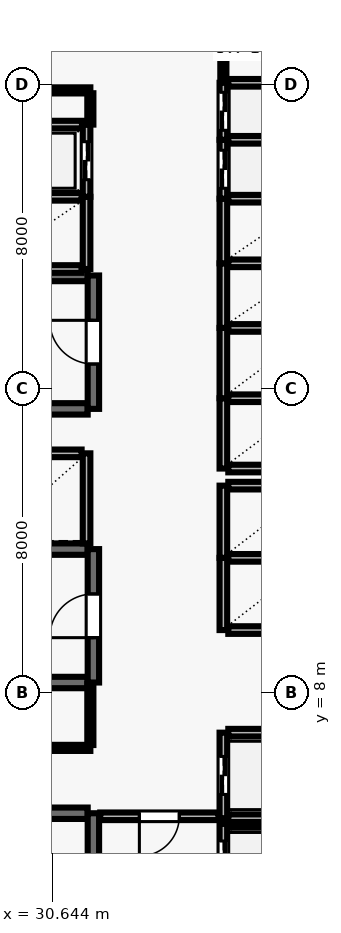
"""IFC4 building model, lengths in metres.
Left out: names, types, materials, properties, quantities, classifications, styles, units other than length and angle.
Written with IfcOpenShell. Run it as: python <this file> out.ifc"""

import sys

from ifc_helpers import new_model, si_unit, direction, frame, frame_2d, origin, place, context, subcontext, project, spatial, rectangle, extrude, element, fill, save


model = new_model("IFC4")
c1 = context("Model", 3, precision=1e-05, world=origin(), true_north=direction((0.0, 1.0)))
c2 = subcontext(c1, "Body", "Model", "MODEL_VIEW")
j1 = project(units=[si_unit("LENGTHUNIT", "METRE"), si_unit("PLANEANGLEUNIT", "RADIAN")], contexts=[c1])
p1 = place(None, origin())
s1 = spatial("IfcSite", under=j1, at=p1, CompositionType="ELEMENT")
p2 = place(p1, origin())
s2 = spatial("IfcBuilding", under=s1, at=p2, CompositionType="ELEMENT")
p3 = place(p2, frame((0.0, 0.0, 70.0)))
s3 = spatial("IfcBuildingStorey", under=s2, at=p3, CompositionType="ELEMENT", Elevation=70.0)
p4 = place(p3, frame((31.58, 4.83, 0.0), z_axis=(0.0, 0.0, 1.0), x_axis=(-1.0, 0.0, 0.0)))
e1 = element("IfcWall", 1, at=p4, inside=s3, PredefinedType="SHEAR", context=c2, shape_type="SweptSolid", body=[
    extrude(rectangle(XDim=8.36, YDim=0.3, at=frame_2d((4.18, 0.0))), origin(), (0.0, 0.0, 1.0), 3.69),
])
p5 = place(p3, frame((31.73, 0.96, 0.0), z_axis=(0.0, 0.0, 1.0), x_axis=(0.0, 1.0, 0.0)))
e2 = element("IfcWall", 2, at=p5, inside=s3, PredefinedType="SHEAR", context=c2, shape_type="SweptSolid", body=[
    extrude(rectangle(XDim=3.87, YDim=0.3, at=frame_2d((1.935, 0.0))), origin(), (0.0, 0.0, 1.0), 3.69),
])
p6 = place(p5, frame((1.54, 0.0, 0.0)))
e3 = element("IfcOpeningElement", 3, at=p6, cuts=e2, PredefinedType="OPENING", context=c2, shape_type="SweptSolid", body=[
    extrude(rectangle(XDim=1.15, YDim=2.15, at=frame_2d((0.575, 1.075))), frame((0.0, 0.16, 0.0), z_axis=(0.0, -1.0, 0.0), x_axis=(1.0, 0.0, 0.0)), (0.0, 0.0, 1.0), 0.32),
])
for number, where, z_axis, x_axis in (
    (4, (31.58, 18.98, 0.0), (0.0, 0.0, 1.0), (-1.0, 0.0, 0.0)),
    (5, (23.22, 15.47, 0.0), (0.0, 0.0, 1.0), (1.0, 0.0, 0.0)),
):
    element("IfcWall", number, at=place(p3, frame(where, z_axis=z_axis, x_axis=x_axis)), inside=s3, PredefinedType="SHEAR", context=c2, shape_type="SweptSolid", body=[
        extrude(rectangle(XDim=8.36, YDim=0.3, at=frame_2d((4.18, 0.0))), origin(), (0.0, 0.0, 1.0), 3.69),
    ])
p7 = place(p3, frame((31.73, 15.47, 0.0), z_axis=(0.0, 0.0, 1.0), x_axis=(0.0, 1.0, 0.0)))
e6 = element("IfcWall", 6, at=p7, inside=s3, PredefinedType="SHEAR", context=c2, shape_type="SweptSolid", body=[
    extrude(rectangle(XDim=3.51, YDim=0.3, at=frame_2d((1.755, 0.0))), origin(), (0.0, 0.0, 1.0), 3.69),
])
p8 = place(p7, frame((1.18, 0.0, 0.0)))
e7 = element("IfcOpeningElement", 7, at=p8, cuts=e6, PredefinedType="OPENING", context=c2, shape_type="SweptSolid", body=[
    extrude(rectangle(XDim=1.15, YDim=2.15, at=frame_2d((0.575, 1.075))), frame((0.0, 0.16, 0.0), z_axis=(0.0, -1.0, 0.0), x_axis=(1.0, 0.0, 0.0)), (0.0, 0.0, 1.0), 0.32),
])
for number, where, z_axis, x_axis in (
    (8, (31.58, 11.78, 0.0), (0.0, 0.0, 1.0), (-1.0, 0.0, 0.0)),
    (9, (23.22, 8.27, 0.0), (0.0, 0.0, 1.0), (1.0, 0.0, 0.0)),
):
    element("IfcWall", number, at=place(p3, frame(where, z_axis=z_axis, x_axis=x_axis)), inside=s3, PredefinedType="SHEAR", context=c2, shape_type="SweptSolid", body=[
        extrude(rectangle(XDim=8.36, YDim=0.3, at=frame_2d((4.18, 0.0))), origin(), (0.0, 0.0, 1.0), 3.69),
    ])
p9 = place(p3, frame((31.73, 8.27, 0.0), z_axis=(0.0, 0.0, 1.0), x_axis=(0.0, 1.0, 0.0)))
e10 = element("IfcWall", 10, at=p9, inside=s3, PredefinedType="SHEAR", context=c2, shape_type="SweptSolid", body=[
    extrude(rectangle(XDim=3.51, YDim=0.3, at=frame_2d((1.755, 0.0))), origin(), (0.0, 0.0, 1.0), 3.69),
])
p10 = place(p9, frame((1.18, 0.0, 0.0)))
e11 = element("IfcOpeningElement", 11, at=p10, cuts=e10, PredefinedType="OPENING", context=c2, shape_type="SweptSolid", body=[
    extrude(rectangle(XDim=1.15, YDim=2.15, at=frame_2d((0.575, 1.075))), frame((0.0, 0.16, 0.0), z_axis=(0.0, -1.0, 0.0), x_axis=(1.0, 0.0, 0.0)), (0.0, 0.0, 1.0), 0.32),
])
p11 = place(p3, frame((35.15, 4.55, 0.0), z_axis=(0.0, 0.0, 1.0), x_axis=(0.0, -1.0, 0.0)))
e12 = element("IfcWall", 12, at=p11, inside=s3, PredefinedType="SOLIDWALL", context=c2, shape_type="SweptSolid", body=[
    extrude(rectangle(XDim=2.1, YDim=0.2, at=frame_2d((1.05, 0.0))), origin(), (0.0, 0.0, 1.0), 3.69),
])
p12 = place(p11, frame((0.45, 0.0, 0.0)))
e13 = element("IfcOpeningElement", 13, at=p12, cuts=e12, PredefinedType="OPENING", context=c2, shape_type="SweptSolid", body=[
    extrude(rectangle(XDim=1.2, YDim=2.15, at=frame_2d((0.6, 1.075))), frame((0.0, 0.11, 0.0), z_axis=(0.0, -1.0, 0.0), x_axis=(1.0, 0.0, 0.0)), (0.0, 0.0, 1.0), 0.22),
])
p13 = place(p3, frame((37.42, 4.55, 0.0), z_axis=(0.0, 0.0, 1.0), x_axis=(-1.0, 0.0, 0.0)))
e14 = element("IfcWall", 14, at=p13, inside=s3, PredefinedType="SOLIDWALL", context=c2, shape_type="SweptSolid", body=[
    extrude(rectangle(XDim=2.14, YDim=0.2, at=frame_2d((1.07, 0.0))), origin(), (0.0, 0.0, 1.0), 3.69),
])
p14 = place(p3, frame((35.15, 6.95, 0.0), z_axis=(0.0, 0.0, 1.0), x_axis=(0.0, -1.0, 0.0)))
e15 = element("IfcWall", 15, at=p14, inside=s3, PredefinedType="SOLIDWALL", context=c2, shape_type="SweptSolid", body=[
    extrude(rectangle(XDim=2.25, YDim=0.2, at=frame_2d((1.125, 0.0))), origin(), (0.0, 0.0, 1.0), 3.69),
])
p15 = place(p14, frame((0.625, 0.0, 0.0)))
e16 = element("IfcOpeningElement", 16, at=p15, cuts=e15, PredefinedType="OPENING", context=c2, shape_type="SweptSolid", body=[
    extrude(rectangle(XDim=1.0, YDim=2.1, at=frame_2d((0.5, 1.05))), frame((0.0, 0.11, 0.0), z_axis=(0.0, -1.0, 0.0), x_axis=(1.0, 0.0, 0.0)), (0.0, 0.0, 1.0), 0.22),
])
for number, where, z_axis, x_axis in (
    (17, (35.28, 4.7, 0.0), (0.0, 0.0, 1.0), (1.0, 0.0, 0.0)),
    (18, (37.42, 6.95, 0.0), (0.0, 0.0, 1.0), (-1.0, 0.0, 0.0)),
):
    element("IfcWall", number, at=place(p3, frame(where, z_axis=z_axis, x_axis=x_axis)), inside=s3, PredefinedType="SOLIDWALL", context=c2, shape_type="SweptSolid", body=[
        extrude(rectangle(XDim=2.14, YDim=0.2, at=frame_2d((1.07, 0.0))), origin(), (0.0, 0.0, 1.0), 3.69),
    ])
p16 = place(p3, frame((35.15, 11.55, 0.0), z_axis=(0.0, 0.0, 1.0), x_axis=(0.0, -1.0, 0.0)))
e19 = element("IfcWall", 19, at=p16, inside=s3, PredefinedType="SOLIDWALL", context=c2, shape_type="SweptSolid", body=[
    extrude(rectangle(XDim=1.9, YDim=0.2, at=frame_2d((0.95, 0.0))), origin(), (0.0, 0.0, 1.0), 3.69),
])
for number, where, z_axis, x_axis in (
    (20, (35.28, 9.65, 0.0), (0.0, 0.0, 1.0), (1.0, 0.0, 0.0)),
    (21, (37.42, 11.55, 0.0), (0.0, 0.0, 1.0), (-1.0, 0.0, 0.0)),
):
    element("IfcWall", number, at=place(p3, frame(where, z_axis=z_axis, x_axis=x_axis)), inside=s3, PredefinedType="SOLIDWALL", context=c2, shape_type="SweptSolid", body=[
        extrude(rectangle(XDim=2.14, YDim=0.2, at=frame_2d((1.07, 0.0))), origin(), (0.0, 0.0, 1.0), 3.69),
    ])
p17 = place(p3, frame((35.15, 13.45, 0.0), z_axis=(0.0, 0.0, 1.0), x_axis=(0.0, -1.0, 0.0)))
e22 = element("IfcWall", 22, at=p17, inside=s3, PredefinedType="SOLIDWALL", context=c2, shape_type="SweptSolid", body=[
    extrude(rectangle(XDim=1.9, YDim=0.2, at=frame_2d((0.95, 0.0))), origin(), (0.0, 0.0, 1.0), 3.69),
])
p18 = place(p3, frame((37.42, 13.45, 0.0), z_axis=(0.0, 0.0, 1.0), x_axis=(-1.0, 0.0, 0.0)))
e23 = element("IfcWall", 23, at=p18, inside=s3, PredefinedType="SOLIDWALL", context=c2, shape_type="SweptSolid", body=[
    extrude(rectangle(XDim=2.14, YDim=0.2, at=frame_2d((1.07, 0.0))), origin(), (0.0, 0.0, 1.0), 3.69),
])
p19 = place(p3, frame((31.55, 11.93, 0.0), z_axis=(0.0, 0.0, 1.0), x_axis=(0.0, 1.0, 0.0)))
e24 = element("IfcWall", 24, at=p19, inside=s3, PredefinedType="SOLIDWALL", context=c2, shape_type="SweptSolid", body=[
    extrude(rectangle(XDim=2.37, YDim=0.2, at=frame_2d((1.185, 0.0))), origin(), (0.0, 0.0, 1.0), 3.69),
])
p20 = place(p3, frame((31.42, 14.3, 0.0), z_axis=(0.0, 0.0, 1.0), x_axis=(-1.0, 0.0, 0.0)))
e25 = element("IfcWall", 25, at=p20, inside=s3, PredefinedType="SOLIDWALL", context=c2, shape_type="SweptSolid", body=[
    extrude(rectangle(XDim=2.44, YDim=0.2, at=frame_2d((1.22, 0.0))), origin(), (0.0, 0.0, 1.0), 3.69),
])
p21 = place(p3, frame((35.15, 15.75, 0.0), z_axis=(0.0, 0.0, 1.0), x_axis=(0.0, -1.0, 0.0)))
e26 = element("IfcWall", 26, at=p21, inside=s3, PredefinedType="SOLIDWALL", context=c2, shape_type="SweptSolid", body=[
    extrude(rectangle(XDim=1.85, YDim=0.2, at=frame_2d((0.925, 0.0))), origin(), (0.0, 0.0, 1.0), 3.69),
])
for number, where, z_axis, x_axis in (
    (27, (35.28, 13.9, 0.0), (0.0, 0.0, 1.0), (1.0, 0.0, 0.0)),
    (28, (37.42, 15.75, 0.0), (0.0, 0.0, 1.0), (-1.0, 0.0, 0.0)),
):
    element("IfcWall", number, at=place(p3, frame(where, z_axis=z_axis, x_axis=x_axis)), inside=s3, PredefinedType="SOLIDWALL", context=c2, shape_type="SweptSolid", body=[
        extrude(rectangle(XDim=2.14, YDim=0.2, at=frame_2d((1.07, 0.0))), origin(), (0.0, 0.0, 1.0), 3.69),
    ])
p22 = place(p3, frame((35.15, 17.6, 0.0), z_axis=(0.0, 0.0, 1.0), x_axis=(0.0, -1.0, 0.0)))
e29 = element("IfcWall", 29, at=p22, inside=s3, PredefinedType="SOLIDWALL", context=c2, shape_type="SweptSolid", body=[
    extrude(rectangle(XDim=1.85, YDim=0.2, at=frame_2d((0.925, 0.0))), origin(), (0.0, 0.0, 1.0), 3.69),
])
p23 = place(p3, frame((37.42, 17.6, 0.0), z_axis=(0.0, 0.0, 1.0), x_axis=(-1.0, 0.0, 0.0)))
e30 = element("IfcWall", 30, at=p23, inside=s3, PredefinedType="SOLIDWALL", context=c2, shape_type="SweptSolid", body=[
    extrude(rectangle(XDim=2.14, YDim=0.2, at=frame_2d((1.07, 0.0))), origin(), (0.0, 0.0, 1.0), 3.69),
])
p24 = place(p3, frame((35.15, 19.3, 0.0), z_axis=(0.0, 0.0, 1.0), x_axis=(0.0, -1.0, 0.0)))
e31 = element("IfcWall", 31, at=p24, inside=s3, PredefinedType="SOLIDWALL", context=c2, shape_type="SweptSolid", body=[
    extrude(rectangle(XDim=1.7, YDim=0.2, at=frame_2d((0.85, 0.0))), origin(), (0.0, 0.0, 1.0), 3.69),
])
p25 = place(p3, frame((37.42, 19.3, 0.0), z_axis=(0.0, 0.0, 1.0), x_axis=(-1.0, 0.0, 0.0)))
e32 = element("IfcWall", 32, at=p25, inside=s3, PredefinedType="SOLIDWALL", context=c2, shape_type="SweptSolid", body=[
    extrude(rectangle(XDim=2.14, YDim=0.2, at=frame_2d((1.07, 0.0))), origin(), (0.0, 0.0, 1.0), 3.69),
])
p26 = place(p3, frame((35.15, 21.0, 0.0), z_axis=(0.0, 0.0, 1.0), x_axis=(0.0, -1.0, 0.0)))
e33 = element("IfcWall", 33, at=p26, inside=s3, PredefinedType="SOLIDWALL", context=c2, shape_type="SweptSolid", body=[
    extrude(rectangle(XDim=1.7, YDim=0.2, at=frame_2d((0.85, 0.0))), origin(), (0.0, 0.0, 1.0), 3.69),
])
p27 = place(p3, frame((37.42, 21.0, 0.0), z_axis=(0.0, 0.0, 1.0), x_axis=(-1.0, 0.0, 0.0)))
e34 = element("IfcWall", 34, at=p27, inside=s3, PredefinedType="SOLIDWALL", context=c2, shape_type="SweptSolid", body=[
    extrude(rectangle(XDim=2.14, YDim=0.2, at=frame_2d((1.07, 0.0))), origin(), (0.0, 0.0, 1.0), 3.69),
])
p28 = place(p3, frame((31.55, 19.15, 0.0), z_axis=(0.0, 0.0, 1.0), x_axis=(0.0, 1.0, 0.0)))
e35 = element("IfcWall", 35, at=p28, inside=s3, PredefinedType="SOLIDWALL", context=c2, shape_type="SweptSolid", body=[
    extrude(rectangle(XDim=1.9, YDim=0.2, at=frame_2d((0.95, 0.0))), origin(), (0.0, 0.0, 1.0), 3.69),
])
for number, where, z_axis, x_axis in (
    (36, (28.98, 19.15, 0.0), (0.0, 0.0, 1.0), (1.0, 0.0, 0.0)),
    (37, (31.42, 21.05, 0.0), (0.0, 0.0, 1.0), (-1.0, 0.0, 0.0)),
):
    element("IfcWall", number, at=place(p3, frame(where, z_axis=z_axis, x_axis=x_axis)), inside=s3, PredefinedType="SOLIDWALL", context=c2, shape_type="SweptSolid", body=[
        extrude(rectangle(XDim=2.44, YDim=0.2, at=frame_2d((1.22, 0.0))), origin(), (0.0, 0.0, 1.0), 3.69),
    ])
p29 = place(p3, frame((35.15, 22.55, 0.0), z_axis=(0.0, 0.0, 1.0), x_axis=(0.0, -1.0, 0.0)))
e38 = element("IfcWall", 38, at=p29, inside=s3, PredefinedType="SOLIDWALL", context=c2, shape_type="SweptSolid", body=[
    extrude(rectangle(XDim=1.55, YDim=0.2, at=frame_2d((0.775, 0.0))), origin(), (0.0, 0.0, 1.0), 3.69),
])
p30 = place(p29, frame((0.275, 0.0, 0.0)))
e39 = element("IfcOpeningElement", 39, at=p30, cuts=e38, PredefinedType="OPENING", context=c2, shape_type="SweptSolid", body=[
    extrude(rectangle(XDim=1.0, YDim=2.1, at=frame_2d((0.5, 1.05))), frame((0.0, 0.11, 0.0), z_axis=(0.0, -1.0, 0.0), x_axis=(1.0, 0.0, 0.0)), (0.0, 0.0, 1.0), 0.22),
])
p31 = place(p3, frame((37.42, 22.55, 0.0), z_axis=(0.0, 0.0, 1.0), x_axis=(-1.0, 0.0, 0.0)))
e40 = element("IfcWall", 40, at=p31, inside=s3, PredefinedType="SOLIDWALL", context=c2, shape_type="SweptSolid", body=[
    extrude(rectangle(XDim=2.14, YDim=0.2, at=frame_2d((1.07, 0.0))), origin(), (0.0, 0.0, 1.0), 3.69),
])
p32 = place(p3, frame((35.15, 24.05, 0.0), z_axis=(0.0, 0.0, 1.0), x_axis=(0.0, -1.0, 0.0)))
e41 = element("IfcWall", 41, at=p32, inside=s3, PredefinedType="SOLIDWALL", context=c2, shape_type="SweptSolid", body=[
    extrude(rectangle(XDim=1.5, YDim=0.2, at=frame_2d((0.75, 0.0))), origin(), (0.0, 0.0, 1.0), 3.69),
])
p33 = place(p32, frame((0.25, 0.0, 0.0)))
e42 = element("IfcOpeningElement", 42, at=p33, cuts=e41, PredefinedType="OPENING", context=c2, shape_type="SweptSolid", body=[
    extrude(rectangle(XDim=1.0, YDim=2.1, at=frame_2d((0.5, 1.05))), frame((0.0, 0.11, 0.0), z_axis=(0.0, -1.0, 0.0), x_axis=(1.0, 0.0, 0.0)), (0.0, 0.0, 1.0), 0.22),
])
p34 = place(p3, frame((37.42, 24.05, 0.0), z_axis=(0.0, 0.0, 1.0), x_axis=(-1.0, 0.0, 0.0)))
e43 = element("IfcWall", 43, at=p34, inside=s3, PredefinedType="SOLIDWALL", context=c2, shape_type="SweptSolid", body=[
    extrude(rectangle(XDim=2.14, YDim=0.2, at=frame_2d((1.07, 0.0))), origin(), (0.0, 0.0, 1.0), 3.69),
])
p35 = place(p3, frame((31.55, 21.05, 0.0), z_axis=(0.0, 0.0, 1.0), x_axis=(0.0, 1.0, 0.0)))
e44 = element("IfcWall", 44, at=p35, inside=s3, PredefinedType="SOLIDWALL", context=c2, shape_type="SweptSolid", body=[
    extrude(rectangle(XDim=1.9, YDim=0.2, at=frame_2d((0.95, 0.0))), origin(), (0.0, 0.0, 1.0), 3.69),
])
p36 = place(p35, frame((0.45, 0.0, 0.0)))
e45 = element("IfcOpeningElement", 45, at=p36, cuts=e44, PredefinedType="OPENING", context=c2, shape_type="SweptSolid", body=[
    extrude(rectangle(XDim=1.0, YDim=2.1, at=frame_2d((0.5, 1.05))), frame((0.0, 0.11, 0.0), z_axis=(0.0, -1.0, 0.0), x_axis=(1.0, 0.0, 0.0)), (0.0, 0.0, 1.0), 0.22),
])
p37 = place(p3, frame((31.43, 22.95, 0.0), z_axis=(0.0, 0.0, 1.0), x_axis=(-1.0, 0.0, 0.0)))
e46 = element("IfcWall", 46, at=p37, inside=s3, PredefinedType="SOLIDWALL", context=c2, shape_type="SweptSolid", body=[
    extrude(rectangle(XDim=2.46, YDim=0.2, at=frame_2d((1.23, 0.0))), origin(), (0.0, 0.0, 1.0), 3.69),
])
p38 = place(p3, frame((28.8, 23.85, 0.0), z_axis=(0.0, 0.0, 1.0), x_axis=(1.0, 0.0, 0.0)))
e47 = element("IfcWall", 47, at=p38, inside=s3, PredefinedType="PARTITIONING", context=c2, shape_type="SweptSolid", body=[
    extrude(rectangle(XDim=2.85, YDim=0.16, at=frame_2d((1.425, 0.0))), origin(), (0.0, 0.0, 1.0), 3.69),
])
p39 = place(p3, frame((31.65, 6.55, 0.0), z_axis=(0.0, 0.0, 1.0), x_axis=(-1.0, 0.0, 0.0)))
e48 = element("IfcWall", 48, at=p39, inside=s3, PredefinedType="PARTITIONING", context=c2, shape_type="SweptSolid", body=[
    extrude(rectangle(XDim=4.75, YDim=0.16, at=frame_2d((2.375, 0.0))), origin(), (0.0, 0.0, 1.0), 3.69),
])
p40 = place(p39, frame((1.935, 0.0, 0.0)))
e49 = element("IfcOpeningElement", 49, at=p40, cuts=e48, PredefinedType="OPENING", context=c2, shape_type="SweptSolid", body=[
    extrude(rectangle(XDim=0.88, YDim=2.1, at=frame_2d((0.44, 1.05))), frame((0.0, 0.09, 0.0), z_axis=(0.0, -1.0, 0.0), x_axis=(1.0, 0.0, 0.0)), (0.0, 0.0, 1.0), 0.18),
])
p41 = place(p3, frame((35.02, 4.75, 0.0), z_axis=(0.0, 0.0, 1.0), x_axis=(-1.0, 0.0, 0.0)))
e50 = element("IfcWall", 50, at=p41, inside=s3, PredefinedType="SOLIDWALL", context=c2, shape_type="SweptSolid", body=[
    extrude(rectangle(XDim=3.11, YDim=0.2, at=frame_2d((1.555, 0.0))), origin(), (0.0, 0.0, 1.0), 3.69),
])
p42 = place(p41, frame((1.03, 0.0, 0.0)))
e51 = element("IfcOpeningElement", 51, at=p42, cuts=e50, PredefinedType="OPENING", context=c2, shape_type="SweptSolid", body=[
    extrude(rectangle(XDim=1.05, YDim=2.15, at=frame_2d((0.525, 1.075))), frame((0.0, 0.11, 0.0), z_axis=(0.0, -1.0, 0.0), x_axis=(1.0, 0.0, 0.0)), (0.0, 0.0, 1.0), 0.22),
])
p43 = place(p3, frame((31.65, 8.24, 0.0), z_axis=(0.0, 0.0, 1.0), x_axis=(0.0, -1.0, 0.0)))
e52 = element("IfcWall", 52, at=p43, inside=s3, PredefinedType="PARTITIONING", context=c2, shape_type="SweptSolid", body=[
    extrude(rectangle(XDim=1.615, YDim=0.16, at=frame_2d((0.808, 0.0))), origin(), (0.0, 0.0, 1.0), 3.69),
])
p44 = place(p3, frame((31.65, 23.775, 0.0), z_axis=(0.0, 0.0, 1.0), x_axis=(0.0, -1.0, 0.0)))
e53 = element("IfcWall", 53, at=p44, inside=s3, PredefinedType="PARTITIONING", context=c2, shape_type="SweptSolid", body=[
    extrude(rectangle(XDim=0.825, YDim=0.16, at=frame_2d((0.413, 0.0))), origin(), (0.0, 0.0, 1.0), 3.69),
])
p45 = place(p3, frame((35.15, 24.07, 0.0), z_axis=(0.0, 0.0, 1.0), x_axis=(0.0, 1.0, 0.0)))
e54 = element("IfcWall", 54, at=p45, inside=s3, PredefinedType="PARTITIONING", context=c2, shape_type="SweptSolid", body=[
    extrude(rectangle(XDim=1.855, YDim=0.16, at=frame_2d((0.927, 0.0))), origin(), (0.0, 0.0, 1.0), 3.69),
])
p46 = place(p8, origin())
e55 = element("IfcDoor", 55, at=p46, inside=s3, OperationType="SINGLE_SWING_RIGHT", PredefinedType="DOOR", context=c2, shape_type="SweptSolid", body=[
    extrude(rectangle(XDim=1.15, YDim=2.15, at=frame_2d((0.575, 1.075))), frame((0.0, 0.025, 0.0), z_axis=(0.0, -1.0, 0.0), x_axis=(1.0, 0.0, 0.0)), (0.0, 0.0, 1.0), 0.05),
])
fill(e7, e55)
p47 = place(p10, origin())
e56 = element("IfcDoor", 56, at=p47, inside=s3, OperationType="SINGLE_SWING_LEFT", PredefinedType="DOOR", context=c2, shape_type="SweptSolid", body=[
    extrude(rectangle(XDim=1.15, YDim=2.15, at=frame_2d((0.575, 1.075))), frame((0.0, 0.025, 0.0), z_axis=(0.0, -1.0, 0.0), x_axis=(1.0, 0.0, 0.0)), (0.0, 0.0, 1.0), 0.05),
])
fill(e11, e56)
p48 = place(p12, origin())
e57 = element("IfcDoor", 57, at=p48, inside=s3, OperationType="DOUBLE_DOOR_SLIDING", PredefinedType="DOOR", context=c2, shape_type="SweptSolid", body=[
    extrude(rectangle(XDim=1.2, YDim=2.15, at=frame_2d((0.6, 1.075))), frame((0.0, 0.025, 0.0), z_axis=(0.0, -1.0, 0.0), x_axis=(1.0, 0.0, 0.0)), (0.0, 0.0, 1.0), 0.05),
])
fill(e13, e57)
p49 = place(p15, origin())
e58 = element("IfcDoor", 58, at=p49, inside=s3, OperationType="DOUBLE_DOOR_SLIDING", PredefinedType="DOOR", context=c2, shape_type="SweptSolid", body=[
    extrude(rectangle(XDim=1.0, YDim=2.1, at=frame_2d((0.5, 1.05))), frame((0.0, 0.025, 0.0), z_axis=(0.0, -1.0, 0.0), x_axis=(1.0, 0.0, 0.0)), (0.0, 0.0, 1.0), 0.05),
])
fill(e16, e58)
p50 = place(p30, origin())
e59 = element("IfcDoor", 59, at=p50, inside=s3, OperationType="DOUBLE_DOOR_SLIDING", PredefinedType="DOOR", context=c2, shape_type="SweptSolid", body=[
    extrude(rectangle(XDim=1.0, YDim=2.1, at=frame_2d((0.5, 1.05))), frame((0.0, 0.025, 0.0), z_axis=(0.0, -1.0, 0.0), x_axis=(1.0, 0.0, 0.0)), (0.0, 0.0, 1.0), 0.05),
])
fill(e39, e59)
p51 = place(p33, origin())
e60 = element("IfcDoor", 60, at=p51, inside=s3, OperationType="DOUBLE_DOOR_SLIDING", PredefinedType="DOOR", context=c2, shape_type="SweptSolid", body=[
    extrude(rectangle(XDim=1.0, YDim=2.1, at=frame_2d((0.5, 1.05))), frame((0.0, 0.025, 0.0), z_axis=(0.0, -1.0, 0.0), x_axis=(1.0, 0.0, 0.0)), (0.0, 0.0, 1.0), 0.05),
])
fill(e42, e60)
p52 = place(p36, origin())
e61 = element("IfcDoor", 61, at=p52, inside=s3, OperationType="DOUBLE_DOOR_SLIDING", PredefinedType="DOOR", context=c2, shape_type="SweptSolid", body=[
    extrude(rectangle(XDim=1.0, YDim=2.1, at=frame_2d((0.5, 1.05))), frame((0.0, 0.025, 0.0), z_axis=(0.0, -1.0, 0.0), x_axis=(1.0, 0.0, 0.0)), (0.0, 0.0, 1.0), 0.05),
])
fill(e45, e61)
p53 = place(p42, origin())
e62 = element("IfcDoor", 62, at=p53, inside=s3, OperationType="SINGLE_SWING_RIGHT", PredefinedType="DOOR", context=c2, shape_type="SweptSolid", body=[
    extrude(rectangle(XDim=1.05, YDim=2.15, at=frame_2d((0.525, 1.075))), frame((0.0, 0.025, 0.0), z_axis=(0.0, -1.0, 0.0), x_axis=(1.0, 0.0, 0.0)), (0.0, 0.0, 1.0), 0.05),
])
fill(e51, e62)
save(model, sys.argv[1])
